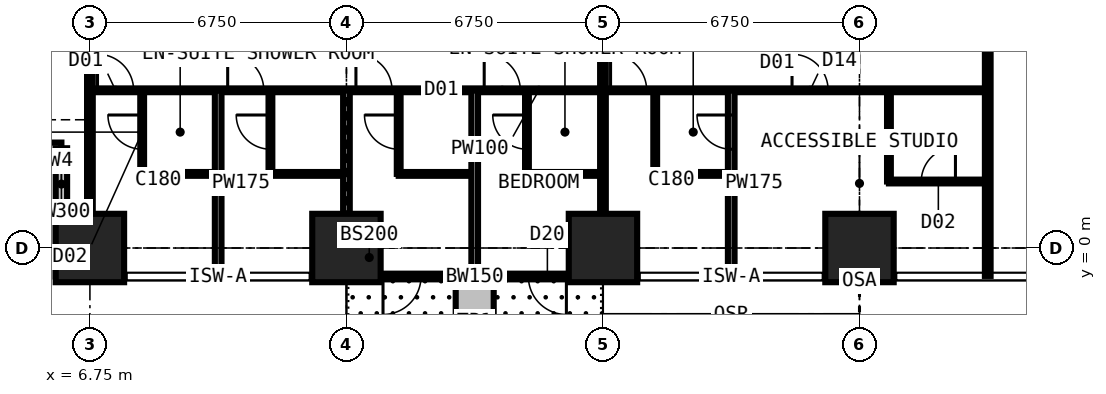
"""IFC4 building model, lengths in metres.
Left out: names, types, materials, properties, quantities, classifications, styles, units other than length and angle.
Written with IfcOpenShell. Run it as: python <this file> out.ifc"""

import sys

from ifc_helpers import new_model, si_unit, direction, frame, frame_2d, origin, origin_2d, place, context, subcontext, project, spatial, rectangle, extrude, element, fill, save


model = new_model("IFC4")
c1 = context("Model", 3, precision=1e-05, world=origin(), true_north=direction((0.0, 1.0)))
c2 = subcontext(c1, "Body", "Model", "MODEL_VIEW")
j1 = project(units=[si_unit("LENGTHUNIT", "METRE"), si_unit("PLANEANGLEUNIT", "RADIAN")], contexts=[c1])
p1 = place(None, origin())
s1 = spatial("IfcSite", under=j1, at=p1, CompositionType="ELEMENT")
p2 = place(p1, origin())
s2 = spatial("IfcBuilding", under=s1, at=p2, CompositionType="ELEMENT")
p3 = place(p2, frame((0.0, 0.0, 68.4)))
s3 = spatial("IfcBuildingStorey", under=s2, at=p3, CompositionType="ELEMENT", Elevation=68.4)
for number, where, z_axis, x_axis in (
    (1, (6.75, 0.0, 0.0), (0.0, 0.0, 1.0), (1.0, 0.0, 0.0)),
    (2, (13.5, 0.0, 0.0), (0.0, 0.0, 1.0), (1.0, 0.0, 0.0)),
    (3, (20.25, 0.0, 0.0), (0.0, 0.0, 1.0), (1.0, 0.0, 0.0)),
    (4, (27.0, 0.0, 0.0), (0.0, 0.0, 1.0), (1.0, 0.0, 0.0)),
):
    element("IfcColumn", number, at=place(p3, frame(where, z_axis=z_axis, x_axis=x_axis)), inside=s3, PredefinedType="COLUMN", context=c2, shape_type="SweptSolid", body=[
        extrude(rectangle(XDim=1.8, YDim=1.8, at=origin_2d()), origin(), (0.0, 0.0, 1.0), 3.6),
    ])
p4 = place(p3, frame((2.625, 2.625, 0.0), z_axis=(0.0, 0.0, 1.0), x_axis=(1.0, 0.0, 0.0)))
e5 = element("IfcWall", 5, at=p4, inside=s3, PredefinedType="SOLIDWALL", context=c2, shape_type="SweptSolid", body=[
    extrude(rectangle(XDim=3.375, YDim=0.3, at=frame_2d((1.688, 0.0))), origin(), (0.0, 0.0, 1.0), 3.375),
])
p5 = place(p4, frame((0.788, 0.0, 0.6)))
e6 = element("IfcOpeningElement", 6, at=p5, cuts=e5, PredefinedType="OPENING", context=c2, shape_type="SweptSolid", body=[
    extrude(rectangle(XDim=1.8, YDim=2.1, at=frame_2d((0.9, 1.05))), frame((0.0, 0.16, 0.0), z_axis=(0.0, -1.0, 0.0), x_axis=(1.0, 0.0, 0.0)), (0.0, 0.0, 1.0), 0.32),
])
p6 = place(p3, frame((6.0, 2.625, 0.0), z_axis=(0.0, 0.0, 1.0), x_axis=(0.0, -1.0, 0.0)))
e7 = element("IfcWall", 7, at=p6, inside=s3, PredefinedType="SOLIDWALL", context=c2, shape_type="SweptSolid", body=[
    extrude(rectangle(XDim=3.375, YDim=0.3, at=frame_2d((1.688, 0.0))), origin(), (0.0, 0.0, 1.0), 3.375),
])
p7 = place(p6, frame((0.343, 0.0, 0.9)))
e8 = element("IfcOpeningElement", 8, at=p7, cuts=e7, PredefinedType="OPENING", context=c2, shape_type="SweptSolid", body=[
    extrude(rectangle(XDim=1.2, YDim=1.8, at=frame_2d((0.6, 0.9))), frame((0.0, 0.16, 0.0), z_axis=(0.0, -1.0, 0.0), x_axis=(1.0, 0.0, 0.0)), (0.0, 0.0, 1.0), 0.32),
])
p8 = place(p3, frame((20.25, -0.75, 0.0), z_axis=(0.0, 0.0, 1.0), x_axis=(-1.0, 0.0, 0.0)))
e9 = element("IfcWall", 9, at=p8, inside=s3, PredefinedType="SOLIDWALL", context=c2, shape_type="SweptSolid", body=[
    extrude(rectangle(XDim=6.75, YDim=0.15, at=frame_2d((3.375, 0.0))), origin(), (0.0, 0.0, 1.0), 3.375),
])
p9 = place(p8, frame((0.962, 0.0, 0.0)))
e10 = element("IfcOpeningElement", 10, at=p9, cuts=e9, PredefinedType="OPENING", context=c2, shape_type="SweptSolid", body=[
    extrude(rectangle(XDim=1.0, YDim=2.2, at=frame_2d((0.5, 1.1))), frame((0.0, 0.085, 0.0), z_axis=(0.0, -1.0, 0.0), x_axis=(1.0, 0.0, 0.0)), (0.0, 0.0, 1.0), 0.17),
])
p10 = place(p8, frame((2.025, 0.0, 0.9)))
e11 = element("IfcOpeningElement", 11, at=p10, cuts=e9, PredefinedType="OPENING", context=c2, shape_type="SweptSolid", body=[
    extrude(rectangle(XDim=1.2, YDim=1.8, at=frame_2d((0.6, 0.9))), frame((0.0, 0.085, 0.0), z_axis=(0.0, -1.0, 0.0), x_axis=(1.0, 0.0, 0.0)), (0.0, 0.0, 1.0), 0.17),
])
p11 = place(p8, frame((4.788, 0.0, 0.0)))
e12 = element("IfcOpeningElement", 12, at=p11, cuts=e9, PredefinedType="OPENING", context=c2, shape_type="SweptSolid", body=[
    extrude(rectangle(XDim=1.0, YDim=2.2, at=frame_2d((0.5, 1.1))), frame((0.0, 0.085, 0.0), z_axis=(0.0, -1.0, 0.0), x_axis=(1.0, 0.0, 0.0)), (0.0, 0.0, 1.0), 0.17),
])
p12 = place(p8, frame((3.525, 0.0, 0.9)))
e13 = element("IfcOpeningElement", 13, at=p12, cuts=e9, PredefinedType="OPENING", context=c2, shape_type="SweptSolid", body=[
    extrude(rectangle(XDim=1.2, YDim=1.8, at=frame_2d((0.6, 0.9))), frame((0.0, 0.085, 0.0), z_axis=(0.0, -1.0, 0.0), x_axis=(1.0, 0.0, 0.0)), (0.0, 0.0, 1.0), 0.17),
])
p13 = place(p3, frame((16.875, -0.85, 0.0), z_axis=(0.0, 0.0, 1.0), x_axis=(0.0, -1.0, 0.0)))
e14 = element("IfcWall", 14, at=p13, inside=s3, PredefinedType="USERDEFINED", context=c2, shape_type="SweptSolid", body=[
    extrude(rectangle(XDim=2.2, YDim=1.0, at=frame_2d((1.1, 0.0))), origin(), (0.0, 0.0, 1.0), 0.9),
])
p14 = place(p3, frame((6.75, -0.734, 0.0), z_axis=(0.0, 0.0, 1.0), x_axis=(0.0, 1.0, 0.0)))
e15 = element("IfcWall", 15, at=p14, inside=s3, PredefinedType="PARTITIONING", context=c2, shape_type="SweptSolid", body=[
    extrude(rectangle(XDim=10.859, YDim=0.15, at=frame_2d((5.429, 0.0))), origin(), (0.0, 0.0, 1.0), 2.877),
])
p15 = place(p3, frame((6.75, 4.15, 0.0), z_axis=(0.0, 0.0, 1.0), x_axis=(1.0, 0.0, 0.0)))
e16 = element("IfcWall", 16, at=p15, inside=s3, PredefinedType="PARTITIONING", context=c2, shape_type="SweptSolid", body=[
    extrude(rectangle(XDim=23.625, YDim=0.1, at=frame_2d((11.812, 0.0))), origin(), (0.0, 0.0, 1.0), 3.375),
])
p16 = place(p15, frame((0.2, 0.0, 0.0)))
e17 = element("IfcOpeningElement", 17, at=p16, cuts=e16, PredefinedType="OPENING", context=c2, shape_type="SweptSolid", body=[
    extrude(rectangle(XDim=0.95, YDim=2.2, at=frame_2d((0.475, 1.1))), frame((0.0, 0.06, 0.0), z_axis=(0.0, -1.0, 0.0), x_axis=(1.0, 0.0, 0.0)), (0.0, 0.0, 1.0), 0.12),
])
p17 = place(p15, frame((3.625, 0.0, 0.0)))
e18 = element("IfcOpeningElement", 18, at=p17, cuts=e16, PredefinedType="OPENING", context=c2, shape_type="SweptSolid", body=[
    extrude(rectangle(XDim=0.95, YDim=2.2, at=frame_2d((0.475, 1.1))), frame((0.0, 0.06, 0.0), z_axis=(0.0, -1.0, 0.0), x_axis=(1.0, 0.0, 0.0)), (0.0, 0.0, 1.0), 0.12),
])
p18 = place(p15, frame((7.0, 0.0, 0.0)))
e19 = element("IfcOpeningElement", 19, at=p18, cuts=e16, PredefinedType="OPENING", context=c2, shape_type="SweptSolid", body=[
    extrude(rectangle(XDim=0.95, YDim=2.2, at=frame_2d((0.475, 1.1))), frame((0.0, 0.06, 0.0), z_axis=(0.0, -1.0, 0.0), x_axis=(1.0, 0.0, 0.0)), (0.0, 0.0, 1.0), 0.12),
])
p19 = place(p15, frame((10.375, 0.0, 0.0)))
e20 = element("IfcOpeningElement", 20, at=p19, cuts=e16, PredefinedType="OPENING", context=c2, shape_type="SweptSolid", body=[
    extrude(rectangle(XDim=0.95, YDim=2.2, at=frame_2d((0.475, 1.1))), frame((0.0, 0.06, 0.0), z_axis=(0.0, -1.0, 0.0), x_axis=(1.0, 0.0, 0.0)), (0.0, 0.0, 1.0), 0.12),
])
p20 = place(p15, frame((18.475, 0.0, 0.0)))
e21 = element("IfcOpeningElement", 21, at=p20, cuts=e16, PredefinedType="OPENING", context=c2, shape_type="SweptSolid", body=[
    extrude(rectangle(XDim=0.95, YDim=2.2, at=frame_2d((0.475, 1.1))), frame((0.0, 0.06, 0.0), z_axis=(0.0, -1.0, 0.0), x_axis=(1.0, 0.0, 0.0)), (0.0, 0.0, 1.0), 0.12),
])
p21 = place(p15, frame((13.7, 0.0, 0.0)))
e22 = element("IfcOpeningElement", 22, at=p21, cuts=e16, PredefinedType="OPENING", context=c2, shape_type="SweptSolid", body=[
    extrude(rectangle(XDim=0.95, YDim=2.2, at=frame_2d((0.475, 1.1))), frame((0.0, 0.06, 0.0), z_axis=(0.0, -1.0, 0.0), x_axis=(1.0, 0.0, 0.0)), (0.0, 0.0, 1.0), 0.12),
])
p22 = place(p3, frame((8.125, 1.95, 0.0), z_axis=(0.0, 0.0, 1.0), x_axis=(0.0, 1.0, 0.0)))
e23 = element("IfcWall", 23, at=p22, inside=s3, PredefinedType="PARTITIONING", context=c2, shape_type="SweptSolid", body=[
    extrude(rectangle(XDim=2.2, YDim=0.1, at=frame_2d((1.1, 0.0))), origin(), (0.0, 0.0, 1.0), 3.375),
])
p23 = place(p22, frame((0.65, 0.0, 0.0)))
e24 = element("IfcOpeningElement", 24, at=p23, cuts=e23, PredefinedType="OPENING", context=c2, shape_type="SweptSolid", body=[
    extrude(rectangle(XDim=0.9, YDim=2.2, at=frame_2d((0.45, 1.1))), frame((0.0, 0.06, 0.0), z_axis=(0.0, -1.0, 0.0), x_axis=(1.0, 0.0, 0.0)), (0.0, 0.0, 1.0), 0.12),
])
p24 = place(p3, frame((8.125, 1.95, 0.0), z_axis=(0.0, 0.0, 1.0), x_axis=(1.0, 0.0, 0.0)))
e25 = element("IfcWall", 25, at=p24, inside=s3, PredefinedType="PARTITIONING", context=c2, shape_type="SweptSolid", body=[
    extrude(rectangle(XDim=2.0, YDim=0.1, at=frame_2d((1.0, 0.0))), origin(), (0.0, 0.0, 1.0), 3.375),
])
p25 = place(p3, frame((10.125, -0.734, 0.0), z_axis=(0.0, 0.0, 1.0), x_axis=(0.0, 1.0, 0.0)))
e26 = element("IfcWall", 26, at=p25, inside=s3, PredefinedType="PARTITIONING", context=c2, shape_type="SweptSolid", body=[
    extrude(rectangle(XDim=4.884, YDim=0.175, at=frame_2d((2.442, 0.0))), origin(), (0.0, 0.0, 1.0), 3.375),
])
p26 = place(p3, frame((11.5, 1.95, 0.0), z_axis=(0.0, 0.0, 1.0), x_axis=(0.0, 1.0, 0.0)))
e27 = element("IfcWall", 27, at=p26, inside=s3, PredefinedType="PARTITIONING", context=c2, shape_type="SweptSolid", body=[
    extrude(rectangle(XDim=2.2, YDim=0.1, at=frame_2d((1.1, 0.0))), origin(), (0.0, 0.0, 1.0), 3.375),
])
p27 = place(p26, frame((0.65, 0.0, 0.0)))
e28 = element("IfcOpeningElement", 28, at=p27, cuts=e27, PredefinedType="OPENING", context=c2, shape_type="SweptSolid", body=[
    extrude(rectangle(XDim=0.9, YDim=2.2, at=frame_2d((0.45, 1.1))), frame((0.0, 0.06, 0.0), z_axis=(0.0, -1.0, 0.0), x_axis=(1.0, 0.0, 0.0)), (0.0, 0.0, 1.0), 0.12),
])
p28 = place(p3, frame((11.5, 1.95, 0.0), z_axis=(0.0, 0.0, 1.0), x_axis=(1.0, 0.0, 0.0)))
e29 = element("IfcWall", 29, at=p28, inside=s3, PredefinedType="PARTITIONING", context=c2, shape_type="SweptSolid", body=[
    extrude(rectangle(XDim=2.0, YDim=0.1, at=frame_2d((1.0, 0.0))), origin(), (0.0, 0.0, 1.0), 3.375),
])
p29 = place(p3, frame((13.5, -0.734, 0.0), z_axis=(0.0, 0.0, 1.0), x_axis=(0.0, 1.0, 0.0)))
e30 = element("IfcWall", 30, at=p29, inside=s3, PredefinedType="PARTITIONING", context=c2, shape_type="SweptSolid", body=[
    extrude(rectangle(XDim=4.884, YDim=0.175, at=frame_2d((2.442, 0.0))), origin(), (0.0, 0.0, 1.0), 2.877),
])
p30 = place(p3, frame((14.875, 1.95, 0.0), z_axis=(0.0, 0.0, 1.0), x_axis=(0.0, 1.0, 0.0)))
e31 = element("IfcWall", 31, at=p30, inside=s3, PredefinedType="PARTITIONING", context=c2, shape_type="SweptSolid", body=[
    extrude(rectangle(XDim=2.2, YDim=0.1, at=frame_2d((1.1, 0.0))), origin(), (0.0, 0.0, 1.0), 3.375),
])
p31 = place(p30, frame((0.65, 0.0, 0.0)))
e32 = element("IfcOpeningElement", 32, at=p31, cuts=e31, PredefinedType="OPENING", context=c2, shape_type="SweptSolid", body=[
    extrude(rectangle(XDim=0.9, YDim=2.2, at=frame_2d((0.45, 1.1))), frame((0.0, 0.06, 0.0), z_axis=(0.0, -1.0, 0.0), x_axis=(1.0, 0.0, 0.0)), (0.0, 0.0, 1.0), 0.12),
])
p32 = place(p3, frame((14.875, 1.95, 0.0), z_axis=(0.0, 0.0, 1.0), x_axis=(1.0, 0.0, 0.0)))
e33 = element("IfcWall", 33, at=p32, inside=s3, PredefinedType="PARTITIONING", context=c2, shape_type="SweptSolid", body=[
    extrude(rectangle(XDim=2.0, YDim=0.1, at=frame_2d((1.0, 0.0))), origin(), (0.0, 0.0, 1.0), 3.375),
])
p33 = place(p3, frame((16.875, -0.734, 0.0), z_axis=(0.0, 0.0, 1.0), x_axis=(0.0, 1.0, 0.0)))
e34 = element("IfcWall", 34, at=p33, inside=s3, PredefinedType="PARTITIONING", context=c2, shape_type="SweptSolid", body=[
    extrude(rectangle(XDim=4.884, YDim=0.175, at=frame_2d((2.442, 0.0))), origin(), (0.0, 0.0, 1.0), 3.375),
])
p34 = place(p3, frame((18.25, 1.95, 0.0), z_axis=(0.0, 0.0, 1.0), x_axis=(0.0, 1.0, 0.0)))
e35 = element("IfcWall", 35, at=p34, inside=s3, PredefinedType="PARTITIONING", context=c2, shape_type="SweptSolid", body=[
    extrude(rectangle(XDim=2.2, YDim=0.1, at=frame_2d((1.1, 0.0))), origin(), (0.0, 0.0, 1.0), 3.375),
])
p35 = place(p34, frame((0.65, 0.0, 0.0)))
e36 = element("IfcOpeningElement", 36, at=p35, cuts=e35, PredefinedType="OPENING", context=c2, shape_type="SweptSolid", body=[
    extrude(rectangle(XDim=0.9, YDim=2.2, at=frame_2d((0.45, 1.1))), frame((0.0, 0.06, 0.0), z_axis=(0.0, -1.0, 0.0), x_axis=(1.0, 0.0, 0.0)), (0.0, 0.0, 1.0), 0.12),
])
p36 = place(p3, frame((18.25, 1.95, 0.0), z_axis=(0.0, 0.0, 1.0), x_axis=(1.0, 0.0, 0.0)))
e37 = element("IfcWall", 37, at=p36, inside=s3, PredefinedType="PARTITIONING", context=c2, shape_type="SweptSolid", body=[
    extrude(rectangle(XDim=2.0, YDim=0.1, at=frame_2d((1.0, 0.0))), origin(), (0.0, 0.0, 1.0), 3.375),
])
p37 = place(p3, frame((20.25, -0.734, 0.0), z_axis=(0.0, 0.0, 1.0), x_axis=(0.0, 1.0, 0.0)))
e38 = element("IfcWall", 38, at=p37, inside=s3, PredefinedType="PARTITIONING", context=c2, shape_type="SweptSolid", body=[
    extrude(rectangle(XDim=12.034, YDim=0.15, at=frame_2d((6.017, 0.0))), origin(), (0.0, 0.0, 1.0), 2.61),
])
p38 = place(p3, frame((21.625, 1.95, 0.0), z_axis=(0.0, 0.0, 1.0), x_axis=(0.0, 1.0, 0.0)))
e39 = element("IfcWall", 39, at=p38, inside=s3, PredefinedType="PARTITIONING", context=c2, shape_type="SweptSolid", body=[
    extrude(rectangle(XDim=2.2, YDim=0.1, at=frame_2d((1.1, 0.0))), origin(), (0.0, 0.0, 1.0), 3.375),
])
p39 = place(p3, frame((21.625, 1.95, 0.0), z_axis=(0.0, 0.0, 1.0), x_axis=(1.0, 0.0, 0.0)))
e40 = element("IfcWall", 40, at=p39, inside=s3, PredefinedType="PARTITIONING", context=c2, shape_type="SweptSolid", body=[
    extrude(rectangle(XDim=2.0, YDim=0.1, at=frame_2d((1.0, 0.0))), origin(), (0.0, 0.0, 1.0), 3.375),
])
p40 = place(p3, frame((23.625, -0.734, 0.0), z_axis=(0.0, 0.0, 1.0), x_axis=(0.0, 1.0, 0.0)))
e41 = element("IfcWall", 41, at=p40, inside=s3, PredefinedType="PARTITIONING", context=c2, shape_type="SweptSolid", body=[
    extrude(rectangle(XDim=4.884, YDim=0.175, at=frame_2d((2.442, 0.0))), origin(), (0.0, 0.0, 1.0), 3.375),
])
p41 = place(p40, frame((3.334, 0.0, 0.0)))
e42 = element("IfcOpeningElement", 42, at=p41, cuts=e41, PredefinedType="OPENING", context=c2, shape_type="SweptSolid", body=[
    extrude(rectangle(XDim=0.9, YDim=2.2, at=frame_2d((0.45, 1.1))), frame((0.0, 0.097, 0.0), z_axis=(0.0, -1.0, 0.0), x_axis=(1.0, 0.0, 0.0)), (0.0, 0.0, 1.0), 0.195),
])
p42 = place(p3, frame((27.775, 1.75, 0.0), z_axis=(0.0, 0.0, 1.0), x_axis=(0.0, 1.0, 0.0)))
e43 = element("IfcWall", 43, at=p42, inside=s3, PredefinedType="PARTITIONING", context=c2, shape_type="SweptSolid", body=[
    extrude(rectangle(XDim=2.4, YDim=0.1, at=frame_2d((1.2, 0.0))), origin(), (0.0, 0.0, 1.0), 3.375),
])
p43 = place(p3, frame((27.775, 1.75, 0.0), z_axis=(0.0, 0.0, 1.0), x_axis=(1.0, 0.0, 0.0)))
e44 = element("IfcWall", 44, at=p43, inside=s3, PredefinedType="PARTITIONING", context=c2, shape_type="SweptSolid", body=[
    extrude(rectangle(XDim=2.6, YDim=0.1, at=frame_2d((1.3, 0.0))), origin(), (0.0, 0.0, 1.0), 3.375),
])
p44 = place(p43, frame((0.85, 0.0, 0.0)))
e45 = element("IfcOpeningElement", 45, at=p44, cuts=e44, PredefinedType="OPENING", context=c2, shape_type="SweptSolid", body=[
    extrude(rectangle(XDim=0.9, YDim=2.2, at=frame_2d((0.45, 1.1))), frame((0.0, 0.06, 0.0), z_axis=(0.0, -1.0, 0.0), x_axis=(1.0, 0.0, 0.0)), (0.0, 0.0, 1.0), 0.12),
])
p45 = place(p3, frame((30.375, -0.734, 0.0), z_axis=(0.0, 0.0, 1.0), x_axis=(0.0, 1.0, 0.0)))
e46 = element("IfcWall", 46, at=p45, inside=s3, PredefinedType="PARTITIONING", context=c2, shape_type="SweptSolid", body=[
    extrude(rectangle(XDim=12.034, YDim=0.15, at=frame_2d((6.017, 0.0))), origin(), (0.0, 0.0, 1.0), 3.375),
])
p46 = place(p7, origin())
e47 = element("IfcWindow", 47, at=p46, inside=s3, PartitioningType="SINGLE_PANEL", PredefinedType="WINDOW", context=c2, shape_type="SweptSolid", body=[
    extrude(rectangle(XDim=1.2, YDim=1.8, at=frame_2d((0.6, 0.9))), frame((0.0, 0.03, 0.0), z_axis=(0.0, -1.0, 0.0), x_axis=(1.0, 0.0, 0.0)), (0.0, 0.0, 1.0), 0.06),
])
fill(e8, e47)
p47 = place(p9, origin())
e48 = element("IfcDoor", 48, at=p47, inside=s3, OperationType="SINGLE_SWING_LEFT", PredefinedType="DOOR", context=c2, shape_type="SweptSolid", body=[
    extrude(rectangle(XDim=1.0, YDim=2.2, at=frame_2d((0.5, 1.1))), frame((0.0, 0.025, 0.0), z_axis=(0.0, -1.0, 0.0), x_axis=(1.0, 0.0, 0.0)), (0.0, 0.0, 1.0), 0.05),
])
fill(e10, e48)
p48 = place(p10, origin())
e49 = element("IfcWindow", 49, at=p48, inside=s3, PartitioningType="SINGLE_PANEL", PredefinedType="WINDOW", context=c2, shape_type="SweptSolid", body=[
    extrude(rectangle(XDim=1.2, YDim=1.8, at=frame_2d((0.6, 0.9))), frame((0.0, 0.03, 0.0), z_axis=(0.0, -1.0, 0.0), x_axis=(1.0, 0.0, 0.0)), (0.0, 0.0, 1.0), 0.06),
])
fill(e11, e49)
p49 = place(p11, origin())
e50 = element("IfcDoor", 50, at=p49, inside=s3, OperationType="SINGLE_SWING_RIGHT", PredefinedType="DOOR", context=c2, shape_type="SweptSolid", body=[
    extrude(rectangle(XDim=1.0, YDim=2.2, at=frame_2d((0.5, 1.1))), frame((0.0, 0.025, 0.0), z_axis=(0.0, -1.0, 0.0), x_axis=(1.0, 0.0, 0.0)), (0.0, 0.0, 1.0), 0.05),
])
fill(e12, e50)
p50 = place(p12, origin())
e51 = element("IfcWindow", 51, at=p50, inside=s3, PartitioningType="SINGLE_PANEL", PredefinedType="WINDOW", context=c2, shape_type="SweptSolid", body=[
    extrude(rectangle(XDim=1.2, YDim=1.8, at=frame_2d((0.6, 0.9))), frame((0.0, 0.03, 0.0), z_axis=(0.0, -1.0, 0.0), x_axis=(1.0, 0.0, 0.0)), (0.0, 0.0, 1.0), 0.06),
])
fill(e13, e51)
p51 = place(p16, origin())
e52 = element("IfcDoor", 52, at=p51, inside=s3, OperationType="SINGLE_SWING_LEFT", PredefinedType="DOOR", context=c2, shape_type="SweptSolid", body=[
    extrude(rectangle(XDim=0.95, YDim=2.2, at=frame_2d((0.475, 1.1))), frame((0.0, 0.025, 0.0), z_axis=(0.0, -1.0, 0.0), x_axis=(1.0, 0.0, 0.0)), (0.0, 0.0, 1.0), 0.05),
])
fill(e17, e52)
p52 = place(p23, origin())
e53 = element("IfcDoor", 53, at=p52, inside=s3, OperationType="SINGLE_SWING_RIGHT", PredefinedType="DOOR", context=c2, shape_type="SweptSolid", body=[
    extrude(rectangle(XDim=0.9, YDim=2.2, at=frame_2d((0.45, 1.1))), frame((0.0, 0.025, 0.0), z_axis=(0.0, -1.0, 0.0), x_axis=(1.0, 0.0, 0.0)), (0.0, 0.0, 1.0), 0.05),
])
fill(e24, e53)
p53 = place(p17, origin())
e54 = element("IfcDoor", 54, at=p53, inside=s3, OperationType="SINGLE_SWING_LEFT", PredefinedType="DOOR", context=c2, shape_type="SweptSolid", body=[
    extrude(rectangle(XDim=0.95, YDim=2.2, at=frame_2d((0.475, 1.1))), frame((0.0, 0.025, 0.0), z_axis=(0.0, -1.0, 0.0), x_axis=(1.0, 0.0, 0.0)), (0.0, 0.0, 1.0), 0.05),
])
fill(e18, e54)
p54 = place(p27, origin())
e55 = element("IfcDoor", 55, at=p54, inside=s3, OperationType="SINGLE_SWING_RIGHT", PredefinedType="DOOR", context=c2, shape_type="SweptSolid", body=[
    extrude(rectangle(XDim=0.9, YDim=2.2, at=frame_2d((0.45, 1.1))), frame((0.0, 0.025, 0.0), z_axis=(0.0, -1.0, 0.0), x_axis=(1.0, 0.0, 0.0)), (0.0, 0.0, 1.0), 0.05),
])
fill(e28, e55)
p55 = place(p18, origin())
e56 = element("IfcDoor", 56, at=p55, inside=s3, OperationType="SINGLE_SWING_LEFT", PredefinedType="DOOR", context=c2, shape_type="SweptSolid", body=[
    extrude(rectangle(XDim=0.95, YDim=2.2, at=frame_2d((0.475, 1.1))), frame((0.0, 0.025, 0.0), z_axis=(0.0, -1.0, 0.0), x_axis=(1.0, 0.0, 0.0)), (0.0, 0.0, 1.0), 0.05),
])
fill(e19, e56)
p56 = place(p31, origin())
e57 = element("IfcDoor", 57, at=p56, inside=s3, OperationType="SINGLE_SWING_RIGHT", PredefinedType="DOOR", context=c2, shape_type="SweptSolid", body=[
    extrude(rectangle(XDim=0.9, YDim=2.2, at=frame_2d((0.45, 1.1))), frame((0.0, 0.025, 0.0), z_axis=(0.0, -1.0, 0.0), x_axis=(1.0, 0.0, 0.0)), (0.0, 0.0, 1.0), 0.05),
])
fill(e32, e57)
p57 = place(p19, origin())
e58 = element("IfcDoor", 58, at=p57, inside=s3, OperationType="SINGLE_SWING_LEFT", PredefinedType="DOOR", context=c2, shape_type="SweptSolid", body=[
    extrude(rectangle(XDim=0.95, YDim=2.2, at=frame_2d((0.475, 1.1))), frame((0.0, 0.025, 0.0), z_axis=(0.0, -1.0, 0.0), x_axis=(1.0, 0.0, 0.0)), (0.0, 0.0, 1.0), 0.05),
])
fill(e20, e58)
p58 = place(p35, origin())
e59 = element("IfcDoor", 59, at=p58, inside=s3, OperationType="SINGLE_SWING_RIGHT", PredefinedType="DOOR", context=c2, shape_type="SweptSolid", body=[
    extrude(rectangle(XDim=0.9, YDim=2.2, at=frame_2d((0.45, 1.1))), frame((0.0, 0.025, 0.0), z_axis=(0.0, -1.0, 0.0), x_axis=(1.0, 0.0, 0.0)), (0.0, 0.0, 1.0), 0.05),
])
fill(e36, e59)
p59 = place(p20, origin())
e60 = element("IfcDoor", 60, at=p59, inside=s3, OperationType="SINGLE_SWING_LEFT", PredefinedType="DOOR", context=c2, shape_type="SweptSolid", body=[
    extrude(rectangle(XDim=0.95, YDim=2.2, at=frame_2d((0.475, 1.1))), frame((0.0, 0.025, 0.0), z_axis=(0.0, -1.0, 0.0), x_axis=(1.0, 0.0, 0.0)), (0.0, 0.0, 1.0), 0.05),
])
fill(e21, e60)
p60 = place(p44, origin())
e61 = element("IfcDoor", 61, at=p60, inside=s3, OperationType="SINGLE_SWING_RIGHT", PredefinedType="DOOR", context=c2, shape_type="SweptSolid", body=[
    extrude(rectangle(XDim=0.9, YDim=2.2, at=frame_2d((0.45, 1.1))), frame((0.0, 0.025, 0.0), z_axis=(0.0, -1.0, 0.0), x_axis=(1.0, 0.0, 0.0)), (0.0, 0.0, 1.0), 0.05),
])
fill(e45, e61)
p61 = place(p21, origin())
e62 = element("IfcDoor", 62, at=p61, inside=s3, OperationType="SINGLE_SWING_LEFT", PredefinedType="DOOR", context=c2, shape_type="SweptSolid", body=[
    extrude(rectangle(XDim=0.95, YDim=2.2, at=frame_2d((0.475, 1.1))), frame((0.0, 0.025, 0.0), z_axis=(0.0, -1.0, 0.0), x_axis=(1.0, 0.0, 0.0)), (0.0, 0.0, 1.0), 0.05),
])
fill(e22, e62)
p62 = place(p41, origin())
e63 = element("IfcDoor", 63, at=p62, inside=s3, OperationType="SINGLE_SWING_RIGHT", PredefinedType="DOOR", context=c2, shape_type="SweptSolid", body=[
    extrude(rectangle(XDim=0.9, YDim=2.2, at=frame_2d((0.45, 1.1))), frame((0.0, 0.025, 0.0), z_axis=(0.0, -1.0, 0.0), x_axis=(1.0, 0.0, 0.0)), (0.0, 0.0, 1.0), 0.05),
])
fill(e42, e63)
save(model, sys.argv[1])
